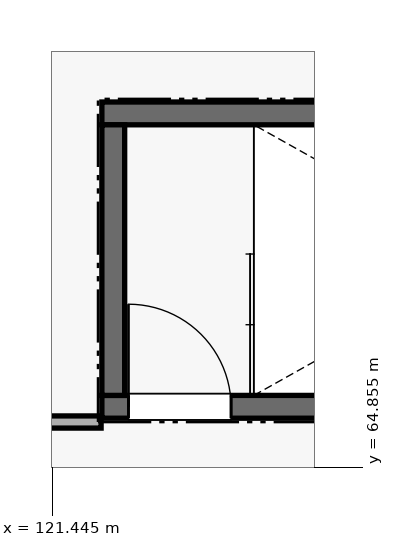
"""IFC4 building model, lengths in metres.
Left out: names, types, materials, properties, quantities, classifications, styles, units other than length and angle.
Written with IfcOpenShell. Run it as: python <this file> out.ifc"""

import sys

from ifc_helpers import new_model, si_unit, direction, frame, frame_2d, origin, place, context, subcontext, project, spatial, rectangle, extrude, element, fill, save


model = new_model("IFC4")
c1 = context("Model", 3, precision=1e-05, world=origin(), true_north=direction((0.0, 1.0)))
c2 = subcontext(c1, "Body", "Model", "MODEL_VIEW")
j1 = project(units=[si_unit("LENGTHUNIT", "METRE"), si_unit("PLANEANGLEUNIT", "RADIAN")], contexts=[c1])
p1 = place(None, origin())
s1 = spatial("IfcSite", under=j1, at=p1, CompositionType="ELEMENT")
p2 = place(p1, origin())
s2 = spatial("IfcBuilding", under=s1, at=p2, CompositionType="ELEMENT")
p3 = place(p2, frame((0.0, 0.0, 9.9)))
s3 = spatial("IfcBuildingStorey", under=s2, at=p3, CompositionType="ELEMENT", Elevation=9.9)
p4 = place(p3, frame((122.1, 65.65, 0.0), z_axis=(0.0, 0.0, 1.0), x_axis=(1.0, 0.0, 0.0)))
e1 = element("IfcWall", 1, at=p4, inside=s3, PredefinedType="SHEAR", context=c2, shape_type="SweptSolid", body=[
    extrude(rectangle(XDim=8.65, YDim=0.3, at=frame_2d((4.325, 0.0))), origin(), (0.0, 0.0, 1.0), 3.99),
])
p5 = place(p4, frame((0.35, 0.0, 0.0)))
e2 = element("IfcOpeningElement", 2, at=p5, cuts=e1, PredefinedType="OPENING", context=c2, shape_type="SweptSolid", body=[
    extrude(rectangle(XDim=1.35, YDim=2.2, at=frame_2d((0.675, 1.1))), frame((0.0, 0.16, 0.0), z_axis=(0.0, -1.0, 0.0), x_axis=(1.0, 0.0, 0.0)), (0.0, 0.0, 1.0), 0.32),
])
p6 = place(p3, frame((130.75, 69.51, 0.0), z_axis=(0.0, 0.0, 1.0), x_axis=(-1.0, 0.0, 0.0)))
e3 = element("IfcWall", 3, at=p6, inside=s3, PredefinedType="SHEAR", context=c2, shape_type="SweptSolid", body=[
    extrude(rectangle(XDim=8.65, YDim=0.3, at=frame_2d((4.325, 0.0))), origin(), (0.0, 0.0, 1.0), 3.99),
])
p7 = place(p3, frame((122.25, 69.36, 0.0), z_axis=(0.0, 0.0, 1.0), x_axis=(0.0, -1.0, 0.0)))
e4 = element("IfcWall", 4, at=p7, inside=s3, PredefinedType="SHEAR", context=c2, shape_type="SweptSolid", body=[
    extrude(rectangle(XDim=3.56, YDim=0.3, at=frame_2d((1.78, 0.0))), origin(), (0.0, 0.0, 1.0), 3.99),
])
p8 = place(p3, frame((106.05, 65.45, 0.0), z_axis=(0.0, 0.0, 1.0), x_axis=(1.0, 0.0, 0.0)))
e5 = element("IfcWall", 5, at=p8, inside=s3, PredefinedType="PARTITIONING", context=c2, shape_type="SweptSolid", body=[
    extrude(rectangle(XDim=16.04, YDim=0.16, at=frame_2d((8.02, 0.0))), origin(), (0.0, 0.0, 1.0), 3.99),
])
p9 = place(p8, frame((6.8, 0.0, 0.0)))
e6 = element("IfcOpeningElement", 6, at=p9, cuts=e5, PredefinedType="OPENING", context=c2, shape_type="SweptSolid", body=[
    extrude(rectangle(XDim=1.02, YDim=2.15, at=frame_2d((0.51, 1.075))), frame((0.0, 0.09, 0.0), z_axis=(0.0, -1.0, 0.0), x_axis=(1.0, 0.0, 0.0)), (0.0, 0.0, 1.0), 0.18),
])
p10 = place(p5, origin())
e7 = element("IfcDoor", 7, at=p10, inside=s3, OperationType="SINGLE_SWING_LEFT", PredefinedType="DOOR", context=c2, shape_type="SweptSolid", body=[
    extrude(rectangle(XDim=1.35, YDim=2.2, at=frame_2d((0.675, 1.1))), frame((0.0, 0.025, 0.0), z_axis=(0.0, -1.0, 0.0), x_axis=(1.0, 0.0, 0.0)), (0.0, 0.0, 1.0), 0.05),
])
fill(e2, e7)
save(model, sys.argv[1])
